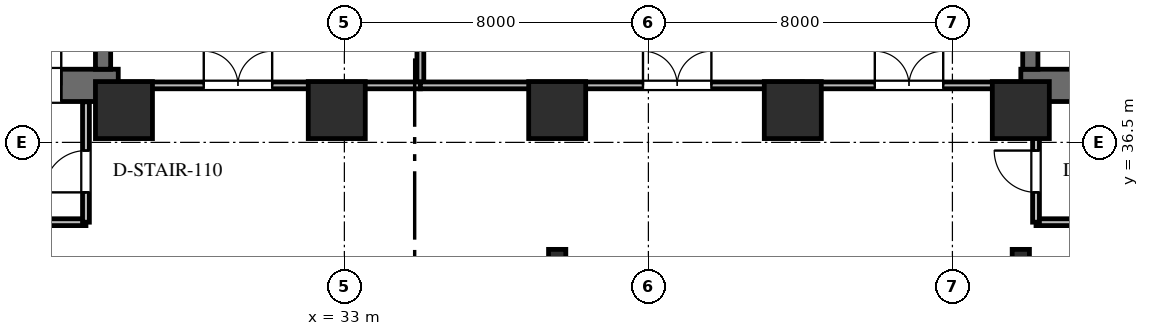
"""IFC4 building model, lengths in metres.
Left out: names, types, materials, properties, quantities, classifications, styles, units other than length and angle.
Written with IfcOpenShell. Run it as: python <this file> out.ifc"""

import sys

from ifc_helpers import new_model, si_unit, direction, frame, frame_2d, origin, origin_2d, place, context, subcontext, project, spatial, rectangle, i_section, extrude, element, fill, save


model = new_model("IFC4")
c1 = context("Model", 3, precision=1e-05, world=origin(), true_north=direction((0.0, 1.0)))
c2 = subcontext(c1, "Body", "Model", "MODEL_VIEW")
j1 = project(units=[si_unit("LENGTHUNIT", "METRE"), si_unit("PLANEANGLEUNIT", "RADIAN")], contexts=[c1])
p1 = place(None, origin())
s1 = spatial("IfcSite", under=j1, at=p1, CompositionType="ELEMENT")
p2 = place(p1, origin())
s2 = spatial("IfcBuilding", under=s1, at=p2, CompositionType="ELEMENT")
p3 = place(p2, origin())
s3 = spatial("IfcBuildingStorey", under=s2, at=p3, CompositionType="ELEMENT", Elevation=0.0)
p4 = place(p3, frame((50.8, 38.0, 0.0), z_axis=(0.0, 0.0, 1.0), x_axis=(1.0, 0.0, 0.0)))
e1 = element("IfcWall", 1, at=p4, inside=s3, PredefinedType="SHEAR", context=c2, shape_type="SweptSolid", body=[
    extrude(rectangle(XDim=5.0, YDim=0.85, at=frame_2d((2.5, 0.0))), origin(), (0.0, 0.0, 1.0), 5.4),
])
p5 = place(p4, frame((2.0, 0.0, 0.0)))
e2 = element("IfcOpeningElement", 2, at=p5, cuts=e1, PredefinedType="OPENING", context=c2, shape_type="SweptSolid", body=[
    extrude(rectangle(XDim=1.2, YDim=2.2, at=frame_2d((0.6, 1.1))), frame((0.0, 0.435, 0.0), z_axis=(0.0, -1.0, 0.0), x_axis=(1.0, 0.0, 0.0)), (0.0, 0.0, 1.0), 0.87),
])
p6 = place(p3, frame((51.05, 38.425, 0.0), z_axis=(0.0, 0.0, 1.0), x_axis=(0.0, 1.0, 0.0)))
e3 = element("IfcWall", 3, at=p6, inside=s3, PredefinedType="SHEAR", context=c2, shape_type="SweptSolid", body=[
    extrude(rectangle(XDim=8.325, YDim=0.4, at=frame_2d((4.163, 0.0))), origin(), (0.0, 0.0, 1.0), 5.4),
])
p7 = place(p3, frame((22.75, 38.0, 0.0), z_axis=(0.0, 0.0, 1.0), x_axis=(1.0, 0.0, 0.0)))
e4 = element("IfcWall", 4, at=p7, inside=s3, PredefinedType="SHEAR", context=c2, shape_type="SweptSolid", body=[
    extrude(rectangle(XDim=4.3, YDim=0.85, at=frame_2d((2.15, 0.0))), origin(), (0.0, 0.0, 1.0), 5.4),
])
p8 = place(p7, frame((1.7, 0.0, 0.0)))
e5 = element("IfcOpeningElement", 5, at=p8, cuts=e4, PredefinedType="OPENING", context=c2, shape_type="SweptSolid", body=[
    extrude(rectangle(XDim=1.1, YDim=2.2, at=frame_2d((0.55, 1.1))), frame((0.0, 0.435, 0.0), z_axis=(0.0, -1.0, 0.0), x_axis=(1.0, 0.0, 0.0)), (0.0, 0.0, 1.0), 0.87),
])
p9 = place(p3, frame((26.65, 38.425, 0.0), z_axis=(0.0, 0.0, 1.0), x_axis=(0.0, 1.0, 0.0)))
e6 = element("IfcWall", 6, at=p9, inside=s3, PredefinedType="SHEAR", context=c2, shape_type="SweptSolid", body=[
    extrude(rectangle(XDim=8.325, YDim=0.4, at=frame_2d((4.163, 0.0))), origin(), (0.0, 0.0, 1.0), 5.4),
])
for number, where, z_axis, x_axis in (
    (7, (38.6, 33.4, 0.0), (0.0, 0.0, 1.0), (1.0, 0.0, 0.0)),
    (8, (50.8, 33.4, 0.0), (0.0, 0.0, 1.0), (1.0, 0.0, 0.0)),
):
    element("IfcColumn", number, at=place(p3, frame(where, z_axis=z_axis, x_axis=x_axis)), inside=s3, PredefinedType="COLUMN", context=c2, shape_type="SweptSolid", body=[
        extrude(i_section(OverallWidth=0.454, OverallDepth=0.569, WebThickness=0.078, FlangeThickness=0.125, FilletRadius=0.03, at=origin_2d()), origin(), (0.0, 0.0, 1.0), 5.4),
    ])
for number, where, z_axis, x_axis in (
    (9, (50.8, 37.35, 0.0), (0.0, 0.0, 1.0), (1.0, 0.0, 0.0)),
    (10, (44.8, 37.35, 0.0), (0.0, 0.0, 1.0), (1.0, 0.0, 0.0)),
    (11, (38.6, 37.35, 0.0), (0.0, 0.0, 1.0), (1.0, 0.0, 0.0)),
    (12, (32.8, 37.35, 0.0), (0.0, 0.0, 1.0), (1.0, 0.0, 0.0)),
    (13, (27.2, 37.35, 0.0), (0.0, 0.0, 1.0), (1.0, 0.0, 0.0)),
):
    element("IfcColumn", number, at=place(p3, frame(where, z_axis=z_axis, x_axis=x_axis)), inside=s3, PredefinedType="COLUMN", context=c2, shape_type="SweptSolid", body=[
        extrude(rectangle(XDim=1.5, YDim=1.5, at=origin_2d()), origin(), (0.0, 0.0, 1.0), 5.4),
    ])
p10 = place(p3, frame((45.05, 38.0, 0.0), z_axis=(0.0, 0.0, 1.0), x_axis=(1.0, 0.0, 0.0)))
e14 = element("IfcWall", 14, at=p10, inside=s3, PredefinedType="STANDARD", context=c2, shape_type="SweptSolid", body=[
    extrude(rectangle(XDim=5.75, YDim=0.18, at=frame_2d((2.875, 0.0))), origin(), (0.0, 0.0, 1.0), 4.182),
])
p11 = place(p10, frame((1.908, 0.0, 0.0)))
e15 = element("IfcOpeningElement", 15, at=p11, cuts=e14, PredefinedType="OPENING", context=c2, shape_type="SweptSolid", body=[
    extrude(rectangle(XDim=1.8, YDim=2.2, at=frame_2d((0.9, 1.1))), frame((0.0, 0.1, 0.0), z_axis=(0.0, -1.0, 0.0), x_axis=(1.0, 0.0, 0.0)), (0.0, 0.0, 1.0), 0.2),
])
p12 = place(p3, frame((35.0, 38.0, 0.0), z_axis=(0.0, 0.0, 1.0), x_axis=(0.0, 1.0, 0.0)))
e16 = element("IfcWall", 16, at=p12, inside=s3, PredefinedType="STANDARD", context=c2, shape_type="SweptSolid", body=[
    extrude(rectangle(XDim=5.85, YDim=0.18, at=frame_2d((2.925, 0.0))), origin(), (0.0, 0.0, 1.0), 5.13),
])
p13 = place(p3, frame((27.05, 38.0, 0.0), z_axis=(0.0, 0.0, 1.0), x_axis=(1.0, 0.0, 0.0)))
e17 = element("IfcWall", 17, at=p13, inside=s3, PredefinedType="STANDARD", context=c2, shape_type="SweptSolid", body=[
    extrude(rectangle(XDim=7.95, YDim=0.18, at=frame_2d((3.975, 0.0))), origin(), (0.0, 0.0, 1.0), 4.182),
])
p14 = place(p13, frame((2.25, 0.0, 0.0)))
e18 = element("IfcOpeningElement", 18, at=p14, cuts=e17, PredefinedType="OPENING", context=c2, shape_type="SweptSolid", body=[
    extrude(rectangle(XDim=1.8, YDim=2.2, at=frame_2d((0.9, 1.1))), frame((0.0, 0.1, 0.0), z_axis=(0.0, -1.0, 0.0), x_axis=(1.0, 0.0, 0.0)), (0.0, 0.0, 1.0), 0.2),
])
p15 = place(p3, frame((35.0, 38.0, 0.0), z_axis=(0.0, 0.0, 1.0), x_axis=(1.0, 0.0, 0.0)))
e19 = element("IfcWall", 19, at=p15, inside=s3, PredefinedType="STANDARD", context=c2, shape_type="SweptSolid", body=[
    extrude(rectangle(XDim=10.05, YDim=0.18, at=frame_2d((5.025, 0.0))), origin(), (0.0, 0.0, 1.0), 4.182),
])
p16 = place(p15, frame((5.858, 0.0, 0.0)))
e20 = element("IfcOpeningElement", 20, at=p16, cuts=e19, PredefinedType="OPENING", context=c2, shape_type="SweptSolid", body=[
    extrude(rectangle(XDim=1.8, YDim=2.2, at=frame_2d((0.9, 1.1))), frame((0.0, 0.1, 0.0), z_axis=(0.0, -1.0, 0.0), x_axis=(1.0, 0.0, 0.0)), (0.0, 0.0, 1.0), 0.2),
])
p17 = place(p3, frame((51.2, 34.4, 0.0), z_axis=(0.0, 0.0, 1.0), x_axis=(1.0, 0.0, 0.0)))
e21 = element("IfcWall", 21, at=p17, inside=s3, PredefinedType="STANDARD", context=c2, shape_type="SweptSolid", body=[
    extrude(rectangle(XDim=22.435, YDim=0.18, at=frame_2d((11.218, 0.0))), origin(), (0.0, 0.0, 1.0), 4.182),
])
p18 = place(p3, frame((51.2, 34.4, 0.0), z_axis=(0.0, 0.0, 1.0), x_axis=(0.0, 1.0, 0.0)))
e22 = element("IfcWall", 22, at=p18, inside=s3, PredefinedType="STANDARD", context=c2, shape_type="SweptSolid", body=[
    extrude(rectangle(XDim=3.167, YDim=0.18, at=frame_2d((1.583, 0.0))), origin(), (0.0, 0.0, 1.0), 4.823),
])
p19 = place(p18, frame((0.785, 0.0, 0.0)))
e23 = element("IfcOpeningElement", 23, at=p19, cuts=e22, PredefinedType="OPENING", context=c2, shape_type="SweptSolid", body=[
    extrude(rectangle(XDim=1.1, YDim=2.2, at=frame_2d((0.55, 1.1))), frame((0.0, 0.1, 0.0), z_axis=(0.0, -1.0, 0.0), x_axis=(1.0, 0.0, 0.0)), (0.0, 0.0, 1.0), 0.2),
])
p20 = place(p3, frame((8.0, 34.4, 0.0), z_axis=(0.0, 0.0, 1.0), x_axis=(1.0, 0.0, 0.0)))
e24 = element("IfcWall", 24, at=p20, inside=s3, PredefinedType="STANDARD", context=c2, shape_type="SweptSolid", body=[
    extrude(rectangle(XDim=18.2, YDim=0.18, at=frame_2d((9.1, 0.0))), origin(), (0.0, 0.0, 1.0), 4.182),
])
p21 = place(p3, frame((26.2, 34.4, 0.0), z_axis=(0.0, 0.0, 1.0), x_axis=(0.0, 1.0, 0.0)))
e25 = element("IfcWall", 25, at=p21, inside=s3, PredefinedType="STANDARD", context=c2, shape_type="SweptSolid", body=[
    extrude(rectangle(XDim=3.167, YDim=0.18, at=frame_2d((1.583, 0.0))), origin(), (0.0, 0.0, 1.0), 4.182),
])
p22 = place(p21, frame((0.785, 0.0, 0.0)))
e26 = element("IfcOpeningElement", 26, at=p22, cuts=e25, PredefinedType="OPENING", context=c2, shape_type="SweptSolid", body=[
    extrude(rectangle(XDim=1.1, YDim=2.2, at=frame_2d((0.55, 1.1))), frame((0.0, 0.1, 0.0), z_axis=(0.0, -1.0, 0.0), x_axis=(1.0, 0.0, 0.0)), (0.0, 0.0, 1.0), 0.2),
])
p23 = place(p8, origin())
e27 = element("IfcDoor", 27, at=p23, inside=s3, OperationType="SINGLE_SWING_RIGHT", PredefinedType="DOOR", context=c2, shape_type="SweptSolid", body=[
    extrude(rectangle(XDim=1.1, YDim=2.2, at=frame_2d((0.55, 1.1))), frame((0.0, 0.025, 0.0), z_axis=(0.0, -1.0, 0.0), x_axis=(1.0, 0.0, 0.0)), (0.0, 0.0, 1.0), 0.05),
])
fill(e5, e27)
p24 = place(p11, origin())
e28 = element("IfcDoor", 28, at=p24, inside=s3, OperationType="DOUBLE_DOOR_SINGLE_SWING", PredefinedType="DOOR", context=c2, shape_type="SweptSolid", body=[
    extrude(rectangle(XDim=1.8, YDim=2.2, at=frame_2d((0.9, 1.1))), frame((0.0, 0.025, 0.0), z_axis=(0.0, -1.0, 0.0), x_axis=(1.0, 0.0, 0.0)), (0.0, 0.0, 1.0), 0.05),
])
fill(e15, e28)
p25 = place(p14, origin())
e29 = element("IfcDoor", 29, at=p25, inside=s3, OperationType="DOUBLE_DOOR_SINGLE_SWING", PredefinedType="DOOR", context=c2, shape_type="SweptSolid", body=[
    extrude(rectangle(XDim=1.8, YDim=2.2, at=frame_2d((0.9, 1.1))), frame((0.0, 0.025, 0.0), z_axis=(0.0, -1.0, 0.0), x_axis=(1.0, 0.0, 0.0)), (0.0, 0.0, 1.0), 0.05),
])
fill(e18, e29)
p26 = place(p16, origin())
e30 = element("IfcDoor", 30, at=p26, inside=s3, OperationType="DOUBLE_DOOR_SINGLE_SWING", PredefinedType="DOOR", context=c2, shape_type="SweptSolid", body=[
    extrude(rectangle(XDim=1.8, YDim=2.2, at=frame_2d((0.9, 1.1))), frame((0.0, 0.025, 0.0), z_axis=(0.0, -1.0, 0.0), x_axis=(1.0, 0.0, 0.0)), (0.0, 0.0, 1.0), 0.05),
])
fill(e20, e30)
p27 = place(p19, origin())
e31 = element("IfcDoor", 31, at=p27, inside=s3, OperationType="SINGLE_SWING_RIGHT", PredefinedType="DOOR", context=c2, shape_type="SweptSolid", body=[
    extrude(rectangle(XDim=1.1, YDim=2.2, at=frame_2d((0.55, 1.1))), frame((0.0, 0.025, 0.0), z_axis=(0.0, -1.0, 0.0), x_axis=(1.0, 0.0, 0.0)), (0.0, 0.0, 1.0), 0.05),
])
fill(e23, e31)
p28 = place(p22, origin())
e32 = element("IfcDoor", 32, at=p28, inside=s3, OperationType="SINGLE_SWING_LEFT", PredefinedType="DOOR", context=c2, shape_type="SweptSolid", body=[
    extrude(rectangle(XDim=1.1, YDim=2.2, at=frame_2d((0.55, 1.1))), frame((0.0, 0.025, 0.0), z_axis=(0.0, -1.0, 0.0), x_axis=(1.0, 0.0, 0.0)), (0.0, 0.0, 1.0), 0.05),
])
fill(e26, e32)
save(model, sys.argv[1])
